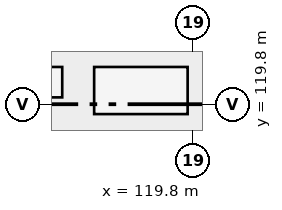
"""IFC4 building model, lengths in metres.
Left out: names, types, materials, properties, quantities, classifications, styles, units other than length and angle.
Written with IfcOpenShell. Run it as: python <this file> out.ifc"""

import sys

from ifc_helpers import new_model, si_unit, direction, frame, frame_2d, origin, place, context, subcontext, project, spatial, rectangle, extrude, element, fill, save


model = new_model("IFC4")
c1 = context("Model", 3, precision=1e-05, world=origin(), true_north=direction((0.0, 1.0)))
c2 = subcontext(c1, "Body", "Model", "MODEL_VIEW")
j1 = project(units=[si_unit("LENGTHUNIT", "METRE"), si_unit("PLANEANGLEUNIT", "RADIAN")], contexts=[c1])
p1 = place(None, origin())
s1 = spatial("IfcSite", under=j1, at=p1, CompositionType="ELEMENT")
p2 = place(p1, origin())
s2 = spatial("IfcBuilding", under=s1, at=p2, CompositionType="ELEMENT")
p3 = place(p2, origin())
s3 = spatial("IfcBuildingStorey", under=s2, at=p3, CompositionType="ELEMENT", Elevation=0.0)
p4 = place(p3, frame((119.92, 122.425, 0.0), z_axis=(0.0, 0.0, 1.0), x_axis=(-1.0, 0.0, 0.0)))
e1 = element("IfcWall", 1, at=p4, inside=s3, PredefinedType="SHEAR", context=c2, shape_type="SweptSolid", body=[
    extrude(rectangle(XDim=8.545, YDim=0.35, at=frame_2d((4.272, 0.0))), origin(), (0.0, 0.0, 1.0), 4.15),
])
p5 = place(p3, frame((119.45, 118.975, 0.0), z_axis=(0.0, 0.0, 1.0), x_axis=(-1.0, 0.0, 0.0)))
e2 = element("IfcWall", 2, at=p5, inside=s3, PredefinedType="SHEAR", context=c2, shape_type="SweptSolid", body=[
    extrude(rectangle(XDim=8.075, YDim=0.35, at=frame_2d((4.038, 0.0))), origin(), (0.0, 0.0, 1.0), 4.15),
])
p6 = place(p5, frame((6.38, 0.0, 0.0)))
e3 = element("IfcOpeningElement", 3, at=p6, cuts=e2, PredefinedType="OPENING", context=c2, shape_type="SweptSolid", body=[
    extrude(rectangle(XDim=1.24, YDim=2.15, at=frame_2d((0.62, 1.075))), frame((0.0, 0.185, 0.0), z_axis=(0.0, -1.0, 0.0), x_axis=(1.0, 0.0, 0.0)), (0.0, 0.0, 1.0), 0.37),
])
p7 = place(p3, frame((119.625, 118.65, 0.0), z_axis=(0.0, 0.0, 1.0), x_axis=(0.0, 1.0, 0.0)))
e4 = element("IfcWall", 4, at=p7, inside=s3, PredefinedType="SHEAR", context=c2, shape_type="SweptSolid", body=[
    extrude(rectangle(XDim=3.6, YDim=0.35, at=frame_2d((1.8, 0.0))), origin(), (0.0, 0.0, 1.0), 4.15),
])
p8 = place(p3, frame((111.35, 122.475, 0.0), z_axis=(0.0, 0.0, 1.0), x_axis=(-1.0, 0.0, 0.0)))
e5 = element("IfcWall", 5, at=p8, inside=s3, PredefinedType="SHEAR", context=c2, shape_type="SweptSolid", body=[
    extrude(rectangle(XDim=2.8, YDim=0.25, at=frame_2d((1.4, 0.0))), origin(), (0.0, 0.0, 1.0), 4.15),
])
p9 = place(p3, frame((114.3, 116.02, 0.0), z_axis=(0.0, 0.0, 1.0), x_axis=(0.0, 1.0, 0.0)))
e6 = element("IfcWall", 6, at=p9, inside=s3, PredefinedType="STANDARD", context=c2, shape_type="SweptSolid", body=[
    extrude(rectangle(XDim=2.93, YDim=0.2, at=frame_2d((1.465, 0.0))), origin(), (0.0, 0.0, 1.0), 3.492),
])
p10 = place(p3, frame((111.3, 118.95, 0.0), z_axis=(0.0, 0.0, 1.0), x_axis=(0.0, 1.0, 0.0)))
e7 = element("IfcWall", 7, at=p10, inside=s3, PredefinedType="STANDARD", context=c2, shape_type="SweptSolid", body=[
    extrude(rectangle(XDim=3.3, YDim=0.2, at=frame_2d((1.65, 0.0))), origin(), (0.0, 0.0, 1.0), 4.15),
])
p11 = place(p3, frame((111.3, 120.15, 0.0), z_axis=(0.0, 0.0, 1.0), x_axis=(-1.0, 0.0, 0.0)))
e8 = element("IfcWall", 8, at=p11, inside=s3, PredefinedType="STANDARD", context=c2, shape_type="SweptSolid", body=[
    extrude(rectangle(XDim=2.55, YDim=0.2, at=frame_2d((1.275, 0.0))), origin(), (0.0, 0.0, 1.0), 3.492),
])
p12 = place(p11, frame((0.725, 0.0, 0.0)))
e9 = element("IfcOpeningElement", 9, at=p12, cuts=e8, PredefinedType="OPENING", context=c2, shape_type="SweptSolid", body=[
    extrude(rectangle(XDim=1.1, YDim=2.15, at=frame_2d((0.55, 1.075))), frame((0.0, 0.11, 0.0), z_axis=(0.0, -1.0, 0.0), x_axis=(1.0, 0.0, 0.0)), (0.0, 0.0, 1.0), 0.22),
])
p13 = place(p3, frame((114.2, 122.7, 0.0), z_axis=(0.0, 0.0, 1.0), x_axis=(0.0, 1.0, 0.0)))
e10 = element("IfcWall", 10, at=p13, inside=s3, PredefinedType="PARTITIONING", context=c2, shape_type="SweptSolid", body=[
    extrude(rectangle(XDim=10.82, YDim=0.125, at=frame_2d((5.41, 0.0))), origin(), (0.0, 0.0, 1.0), 3.492),
])
p14 = place(p13, frame((0.899, 0.0, 0.0)))
e11 = element("IfcOpeningElement", 11, at=p14, cuts=e10, PredefinedType="OPENING", context=c2, shape_type="SweptSolid", body=[
    extrude(rectangle(XDim=0.8, YDim=2.1, at=frame_2d((0.4, 1.05))), frame((0.0, 0.073, 0.0), z_axis=(0.0, -1.0, 0.0), x_axis=(1.0, 0.0, 0.0)), (0.0, 0.0, 1.0), 0.145),
])
p15 = place(p3, frame((119.8, 122.7, 0.0), z_axis=(0.0, 0.0, 1.0), x_axis=(0.0, 1.0, 0.0)))
e12 = element("IfcWall", 12, at=p15, inside=s3, PredefinedType="PARTITIONING", context=c2, shape_type="SweptSolid", body=[
    extrude(rectangle(XDim=10.82, YDim=0.15, at=frame_2d((5.41, 0.0))), origin(), (0.0, 0.0, 1.0), 3.492),
])
p16 = place(p15, frame((0.899, 0.0, 0.0)))
e13 = element("IfcOpeningElement", 13, at=p16, cuts=e12, PredefinedType="OPENING", context=c2, shape_type="SweptSolid", body=[
    extrude(rectangle(XDim=0.8, YDim=2.1, at=frame_2d((0.4, 1.05))), frame((0.0, 0.085, 0.0), z_axis=(0.0, -1.0, 0.0), x_axis=(1.0, 0.0, 0.0)), (0.0, 0.0, 1.0), 0.17),
])
p17 = place(p12, origin())
e14 = element("IfcDoor", 14, at=p17, inside=s3, OperationType="SLIDING_TO_LEFT", PredefinedType="DOOR", context=c2, shape_type="SweptSolid", body=[
    extrude(rectangle(XDim=1.1, YDim=2.15, at=frame_2d((0.55, 1.075))), frame((0.0, 0.025, 0.0), z_axis=(0.0, -1.0, 0.0), x_axis=(1.0, 0.0, 0.0)), (0.0, 0.0, 1.0), 0.05),
])
fill(e9, e14)
p18 = place(p6, origin())
e15 = element("IfcDoor", 15, at=p18, inside=s3, OperationType="SINGLE_SWING_LEFT", PredefinedType="DOOR", context=c2, shape_type="SweptSolid", body=[
    extrude(rectangle(XDim=1.24, YDim=2.15, at=frame_2d((0.62, 1.075))), frame((0.0, 0.025, 0.0), z_axis=(0.0, -1.0, 0.0), x_axis=(1.0, 0.0, 0.0)), (0.0, 0.0, 1.0), 0.05),
])
fill(e3, e15)
save(model, sys.argv[1])
